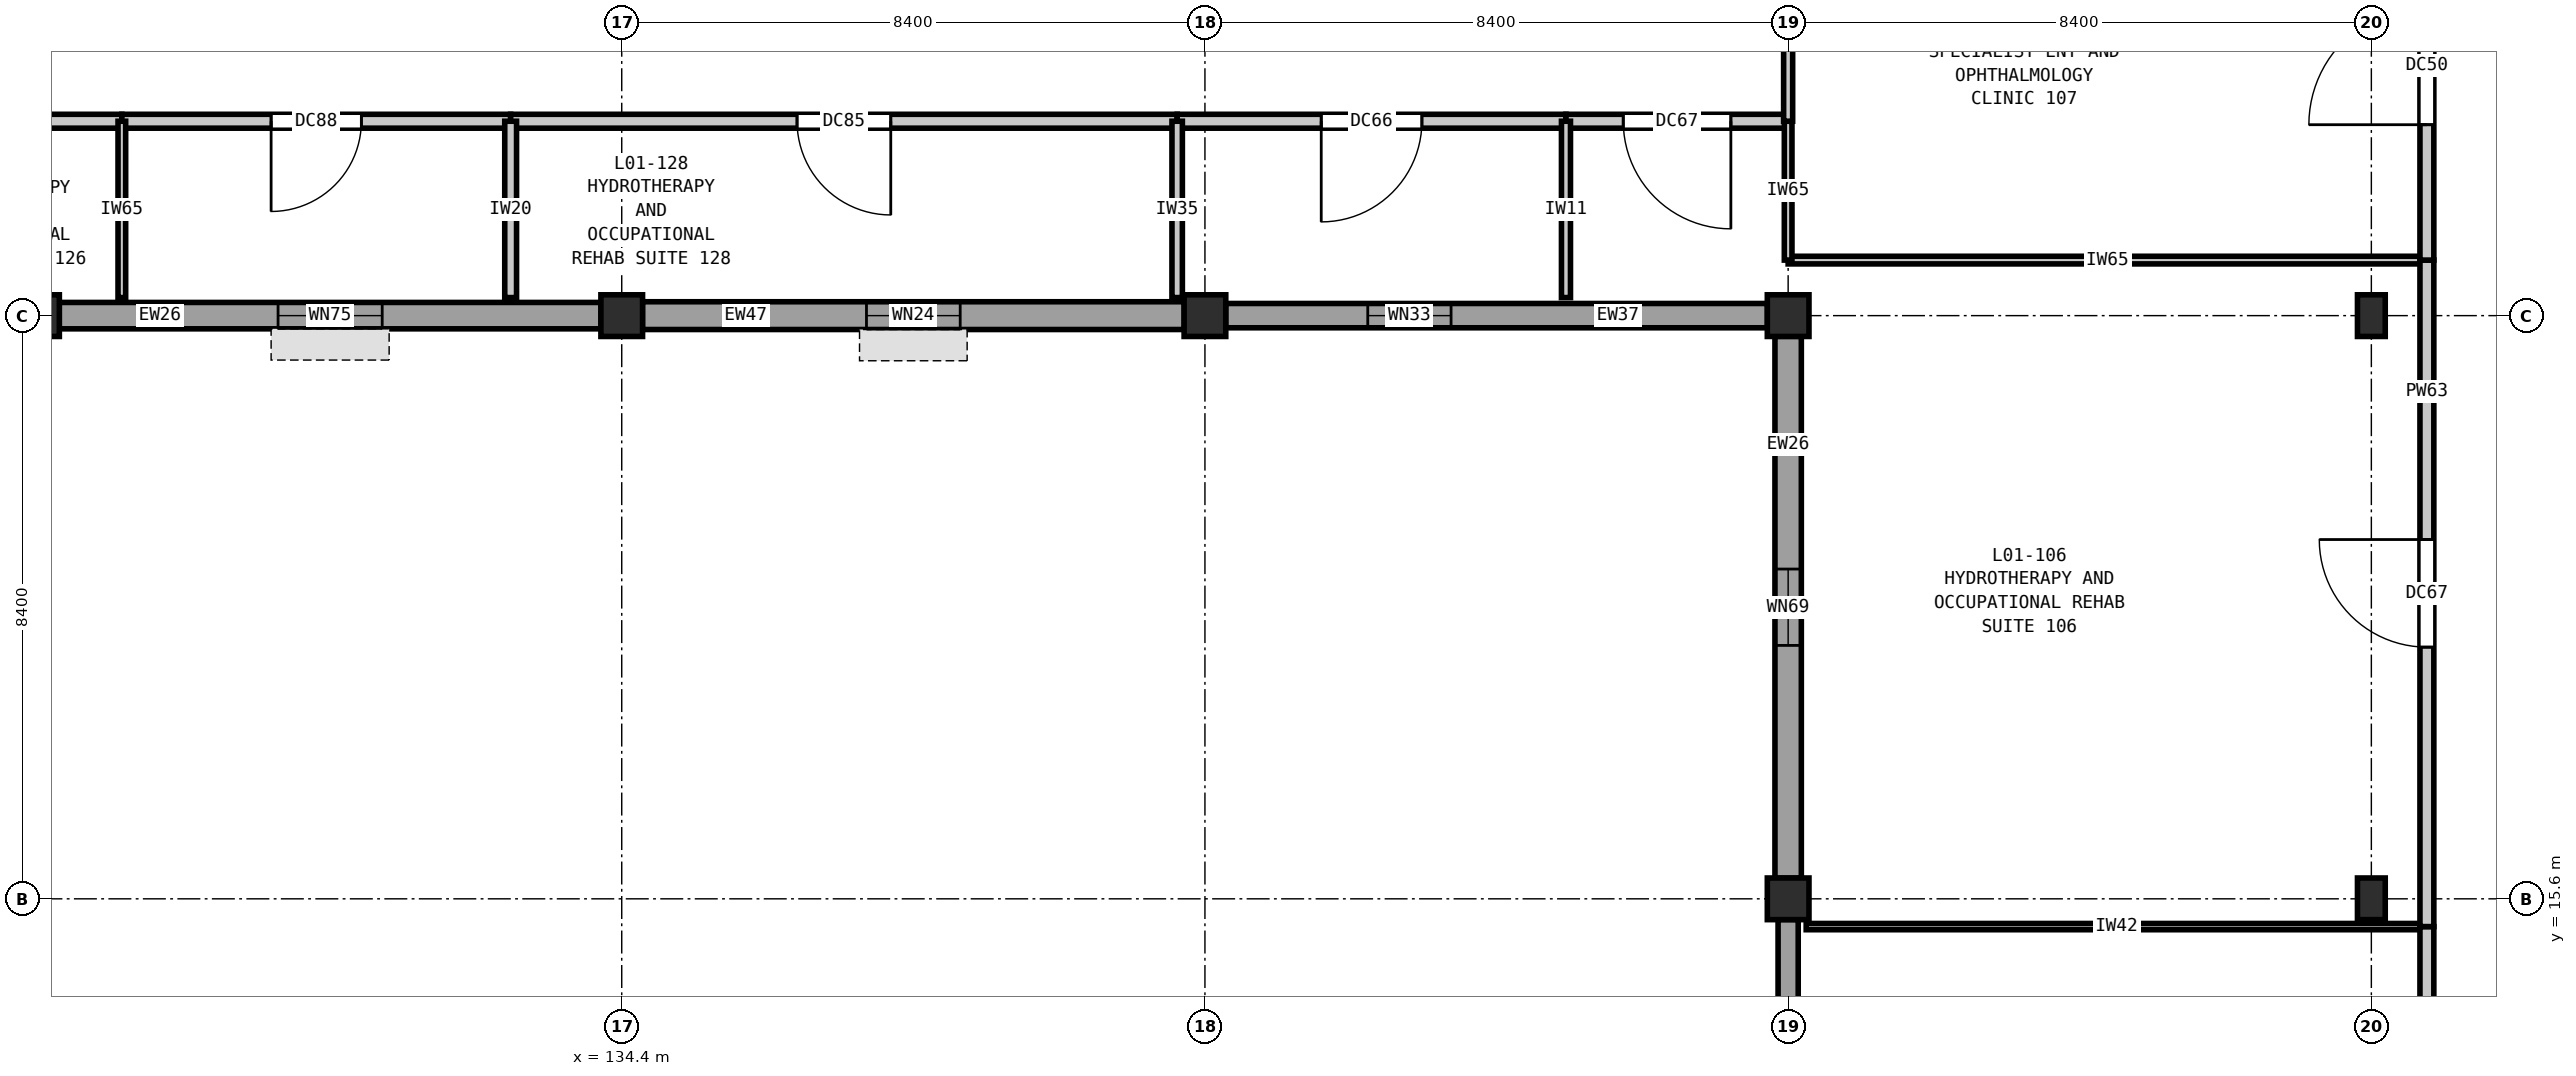
"""IFC4 building model, lengths in metres.
Left out: names, types, materials, properties, quantities, classifications, styles, units other than length and angle.
Written with IfcOpenShell. Run it as: python <this file> out.ifc"""

import sys

from ifc_helpers import new_model, si_unit, direction, frame, frame_2d, origin, origin_2d, place, context, subcontext, project, spatial, rectangle, extrude, element, fill, save


model = new_model("IFC4")
c1 = context("Model", 3, precision=1e-05, world=origin(), true_north=direction((0.0, 1.0)))
c2 = subcontext(c1, "Body", "Model", "MODEL_VIEW")
j1 = project(units=[si_unit("LENGTHUNIT", "METRE"), si_unit("PLANEANGLEUNIT", "RADIAN")], contexts=[c1])
p1 = place(None, origin())
s1 = spatial("IfcSite", under=j1, at=p1, CompositionType="ELEMENT")
p2 = place(p1, origin())
s2 = spatial("IfcBuilding", under=s1, at=p2, CompositionType="ELEMENT")
p3 = place(p2, frame((0.0, 0.0, 5.4)))
s3 = spatial("IfcBuildingStorey", under=s2, at=p3, CompositionType="ELEMENT", Elevation=5.4)
for number, where, z_axis, x_axis in (
    (1, (126.0, 24.0, 0.0), (0.0, 0.0, 1.0), (1.0, 0.0, 0.0)),
    (2, (134.4, 24.0, 0.0), (0.0, 0.0, 1.0), (1.0, 0.0, 0.0)),
    (3, (142.8, 24.0, 0.0), (0.0, 0.0, 1.0), (1.0, 0.0, 0.0)),
    (4, (151.2, 15.6, 0.0), (0.0, 0.0, 1.0), (1.0, 0.0, 0.0)),
    (5, (151.2, 24.0, 0.0), (0.0, 0.0, 1.0), (1.0, 0.0, 0.0)),
):
    element("IfcColumn", number, at=place(p3, frame(where, z_axis=z_axis, x_axis=x_axis)), inside=s3, PredefinedType="COLUMN", context=c2, shape_type="SweptSolid", body=[
        extrude(rectangle(XDim=0.6, YDim=0.6, at=origin_2d()), origin(), (0.0, 0.0, 1.0), 5.4),
    ])
for number, where, z_axis, x_axis in (
    (6, (159.6, 15.6, 0.0), (0.0, 0.0, 1.0), (1.0, 0.0, 0.0)),
    (7, (159.6, 24.0, 0.0), (0.0, 0.0, 1.0), (1.0, 0.0, 0.0)),
):
    element("IfcColumn", number, at=place(p3, frame(where, z_axis=z_axis, x_axis=x_axis)), inside=s3, PredefinedType="COLUMN", context=c2, shape_type="SweptSolid", body=[
        extrude(rectangle(XDim=0.4, YDim=0.6, at=origin_2d()), origin(), (0.0, 0.0, 1.0), 5.4),
    ])
p4 = place(p3, frame((151.2, 7.498, 0.0), z_axis=(0.0, 0.0, 1.0), x_axis=(0.0, 1.0, 0.0)))
e8 = element("IfcWall", 8, at=p4, inside=s3, PredefinedType="SOLIDWALL", context=c2, shape_type="SweptSolid", body=[
    extrude(rectangle(XDim=7.804, YDim=0.29, at=frame_2d((3.902, 0.0))), origin(), (0.0, 0.0, 1.0), 4.68),
])
p5 = place(p4, frame((3.402, 0.0, 0.9)))
e9 = element("IfcOpeningElement", 9, at=p5, cuts=e8, PredefinedType="OPENING", context=c2, shape_type="SweptSolid", body=[
    extrude(rectangle(XDim=1.0, YDim=1.55, at=frame_2d((0.5, 0.775))), frame((0.0, 0.155, 0.0), z_axis=(0.0, -1.0, 0.0), x_axis=(1.0, 0.0, 0.0)), (0.0, 0.0, 1.0), 0.31),
])
p6 = place(p3, frame((151.2, 15.898, 0.0), z_axis=(0.0, 0.0, 1.0), x_axis=(0.0, 1.0, 0.0)))
e10 = element("IfcWall", 10, at=p6, inside=s3, PredefinedType="SOLIDWALL", context=c2, shape_type="SweptSolid", body=[
    extrude(rectangle(XDim=7.804, YDim=0.38, at=frame_2d((3.902, 0.0))), origin(), (0.0, 0.0, 1.0), 4.68),
])
p7 = place(p6, frame((3.352, 0.0, 0.9)))
e11 = element("IfcOpeningElement", 11, at=p7, cuts=e10, PredefinedType="OPENING", context=c2, shape_type="SweptSolid", body=[
    extrude(rectangle(XDim=1.1, YDim=1.55, at=frame_2d((0.55, 0.775))), frame((0.0, 0.2, 0.0), z_axis=(0.0, -1.0, 0.0), x_axis=(1.0, 0.0, 0.0)), (0.0, 0.0, 1.0), 0.4),
])
p8 = place(p3, frame((150.902, 24.0, 0.0), z_axis=(0.0, 0.0, 1.0), x_axis=(-1.0, 0.0, 0.0)))
e12 = element("IfcWall", 12, at=p8, inside=s3, PredefinedType="SOLIDWALL", context=c2, shape_type="SweptSolid", body=[
    extrude(rectangle(XDim=7.804, YDim=0.35, at=frame_2d((3.902, 0.0))), origin(), (0.0, 0.0, 1.0), 4.68),
])
p9 = place(p8, frame((4.557, 0.0, 0.9)))
e13 = element("IfcOpeningElement", 13, at=p9, cuts=e12, PredefinedType="OPENING", context=c2, shape_type="SweptSolid", body=[
    extrude(rectangle(XDim=1.2, YDim=1.55, at=frame_2d((0.6, 0.775))), frame((0.0, 0.185, 0.0), z_axis=(0.0, -1.0, 0.0), x_axis=(1.0, 0.0, 0.0)), (0.0, 0.0, 1.0), 0.37),
])
p10 = place(p3, frame((142.502, 24.0, 0.0), z_axis=(0.0, 0.0, 1.0), x_axis=(-1.0, 0.0, 0.0)))
e14 = element("IfcWall", 14, at=p10, inside=s3, PredefinedType="SOLIDWALL", context=c2, shape_type="SweptSolid", body=[
    extrude(rectangle(XDim=7.804, YDim=0.4, at=frame_2d((3.902, 0.0))), origin(), (0.0, 0.0, 1.0), 4.68),
])
p11 = place(p10, frame((3.227, 0.0, 0.9)))
e15 = element("IfcOpeningElement", 15, at=p11, cuts=e14, PredefinedType="OPENING", context=c2, shape_type="SweptSolid", body=[
    extrude(rectangle(XDim=1.35, YDim=1.55, at=frame_2d((0.675, 0.775))), frame((0.0, 0.21, 0.0), z_axis=(0.0, -1.0, 0.0), x_axis=(1.0, 0.0, 0.0)), (0.0, 0.0, 1.0), 0.42),
])
p12 = place(p3, frame((134.102, 24.0, 0.0), z_axis=(0.0, 0.0, 1.0), x_axis=(-1.0, 0.0, 0.0)))
e16 = element("IfcWall", 16, at=p12, inside=s3, PredefinedType="SOLIDWALL", context=c2, shape_type="SweptSolid", body=[
    extrude(rectangle(XDim=7.804, YDim=0.38, at=frame_2d((3.902, 0.0))), origin(), (0.0, 0.0, 1.0), 4.68),
])
p13 = place(p12, frame((3.152, 0.0, 0.9)))
e17 = element("IfcOpeningElement", 17, at=p13, cuts=e16, PredefinedType="OPENING", context=c2, shape_type="SweptSolid", body=[
    extrude(rectangle(XDim=1.5, YDim=1.55, at=frame_2d((0.75, 0.775))), frame((0.0, 0.2, 0.0), z_axis=(0.0, -1.0, 0.0), x_axis=(1.0, 0.0, 0.0)), (0.0, 0.0, 1.0), 0.4),
])
p14 = place(p3, frame((151.46, 15.2, 0.0), z_axis=(0.0, 0.0, 1.0), x_axis=(1.0, 0.0, 0.0)))
e18 = element("IfcWall", 18, at=p14, inside=s3, PredefinedType="PARTITIONING", context=c2, shape_type="SweptSolid", body=[
    extrude(rectangle(XDim=8.94, YDim=0.09, at=frame_2d((4.47, 0.0))), origin(), (0.0, 0.0, 1.0), 5.05),
])
p15 = place(p3, frame((151.2, 24.8, 0.0), z_axis=(0.0, 0.0, 1.0), x_axis=(1.0, 0.0, 0.0)))
e19 = element("IfcWall", 19, at=p15, inside=s3, PredefinedType="PARTITIONING", context=c2, shape_type="SweptSolid", body=[
    extrude(rectangle(XDim=9.2, YDim=0.11, at=frame_2d((4.6, 0.0))), origin(), (0.0, 0.0, 1.0), 5.05),
])
p16 = place(p3, frame((117.6, 26.8, 0.0), z_axis=(0.0, 0.0, 1.0), x_axis=(1.0, 0.0, 0.0)))
e20 = element("IfcWall", 20, at=p16, inside=s3, PredefinedType="PARTITIONING", context=c2, shape_type="SweptSolid", body=[
    extrude(rectangle(XDim=9.6, YDim=0.2, at=frame_2d((4.8, 0.0))), origin(), (0.0, 0.0, 1.0), 5.05),
])
p17 = place(p16, frame((4.175, 0.0, 0.0)))
e21 = element("IfcOpeningElement", 21, at=p17, cuts=e20, PredefinedType="OPENING", context=c2, shape_type="SweptSolid", body=[
    extrude(rectangle(XDim=1.25, YDim=2.15, at=frame_2d((0.625, 1.075))), frame((0.0, 0.11, 0.0), z_axis=(0.0, -1.0, 0.0), x_axis=(1.0, 0.0, 0.0)), (0.0, 0.0, 1.0), 0.22),
])
p18 = place(p3, frame((127.2, 26.8, 0.0), z_axis=(0.0, 0.0, 1.0), x_axis=(1.0, 0.0, 0.0)))
e22 = element("IfcWall", 22, at=p18, inside=s3, PredefinedType="PARTITIONING", context=c2, shape_type="SweptSolid", body=[
    extrude(rectangle(XDim=5.6, YDim=0.2, at=frame_2d((2.8, 0.0))), origin(), (0.0, 0.0, 1.0), 5.05),
])
p19 = place(p18, frame((2.15, 0.0, 0.0)))
e23 = element("IfcOpeningElement", 23, at=p19, cuts=e22, PredefinedType="OPENING", context=c2, shape_type="SweptSolid", body=[
    extrude(rectangle(XDim=1.3, YDim=2.2, at=frame_2d((0.65, 1.1))), frame((0.0, 0.11, 0.0), z_axis=(0.0, -1.0, 0.0), x_axis=(1.0, 0.0, 0.0)), (0.0, 0.0, 1.0), 0.22),
])
p20 = place(p3, frame((132.8, 26.8, 0.0), z_axis=(0.0, 0.0, 1.0), x_axis=(1.0, 0.0, 0.0)))
e24 = element("IfcWall", 24, at=p20, inside=s3, PredefinedType="PARTITIONING", context=c2, shape_type="SweptSolid", body=[
    extrude(rectangle(XDim=9.6, YDim=0.2, at=frame_2d((4.8, 0.0))), origin(), (0.0, 0.0, 1.0), 5.05),
])
p21 = place(p20, frame((4.125, 0.0, 0.0)))
e25 = element("IfcOpeningElement", 25, at=p21, cuts=e24, PredefinedType="OPENING", context=c2, shape_type="SweptSolid", body=[
    extrude(rectangle(XDim=1.35, YDim=2.2, at=frame_2d((0.675, 1.1))), frame((0.0, 0.11, 0.0), z_axis=(0.0, -1.0, 0.0), x_axis=(1.0, 0.0, 0.0)), (0.0, 0.0, 1.0), 0.22),
])
p22 = place(p3, frame((142.4, 26.8, 0.0), z_axis=(0.0, 0.0, 1.0), x_axis=(1.0, 0.0, 0.0)))
e26 = element("IfcWall", 26, at=p22, inside=s3, PredefinedType="PARTITIONING", context=c2, shape_type="SweptSolid", body=[
    extrude(rectangle(XDim=5.6, YDim=0.2, at=frame_2d((2.8, 0.0))), origin(), (0.0, 0.0, 1.0), 5.05),
])
p23 = place(p22, frame((2.075, 0.0, 0.0)))
e27 = element("IfcOpeningElement", 27, at=p23, cuts=e26, PredefinedType="OPENING", context=c2, shape_type="SweptSolid", body=[
    extrude(rectangle(XDim=1.45, YDim=2.25, at=frame_2d((0.725, 1.125))), frame((0.0, 0.11, 0.0), z_axis=(0.0, -1.0, 0.0), x_axis=(1.0, 0.0, 0.0)), (0.0, 0.0, 1.0), 0.22),
])
p24 = place(p3, frame((148.0, 26.8, 0.0), z_axis=(0.0, 0.0, 1.0), x_axis=(1.0, 0.0, 0.0)))
e28 = element("IfcWall", 28, at=p24, inside=s3, PredefinedType="PARTITIONING", context=c2, shape_type="SweptSolid", body=[
    extrude(rectangle(XDim=3.2, YDim=0.2, at=frame_2d((1.6, 0.0))), origin(), (0.0, 0.0, 1.0), 5.05),
])
p25 = place(p24, frame((0.825, 0.0, 0.0)))
e29 = element("IfcOpeningElement", 29, at=p25, cuts=e28, PredefinedType="OPENING", context=c2, shape_type="SweptSolid", body=[
    extrude(rectangle(XDim=1.55, YDim=2.25, at=frame_2d((0.775, 1.125))), frame((0.0, 0.11, 0.0), z_axis=(0.0, -1.0, 0.0), x_axis=(1.0, 0.0, 0.0)), (0.0, 0.0, 1.0), 0.22),
])
p26 = place(p3, frame((127.2, 24.26, 0.0), z_axis=(0.0, 0.0, 1.0), x_axis=(0.0, 1.0, 0.0)))
e30 = element("IfcWall", 30, at=p26, inside=s3, PredefinedType="PARTITIONING", context=c2, shape_type="SweptSolid", body=[
    extrude(rectangle(XDim=2.54, YDim=0.11, at=frame_2d((1.27, 0.0))), origin(), (0.0, 0.0, 1.0), 5.05),
])
p27 = place(p3, frame((132.8, 24.26, 0.0), z_axis=(0.0, 0.0, 1.0), x_axis=(0.0, 1.0, 0.0)))
e31 = element("IfcWall", 31, at=p27, inside=s3, PredefinedType="PARTITIONING", context=c2, shape_type="SweptSolid", body=[
    extrude(rectangle(XDim=2.54, YDim=0.17, at=frame_2d((1.27, 0.0))), origin(), (0.0, 0.0, 1.0), 5.05),
])
p28 = place(p3, frame((142.4, 24.26, 0.0), z_axis=(0.0, 0.0, 1.0), x_axis=(0.0, 1.0, 0.0)))
e32 = element("IfcWall", 32, at=p28, inside=s3, PredefinedType="PARTITIONING", context=c2, shape_type="SweptSolid", body=[
    extrude(rectangle(XDim=2.54, YDim=0.15, at=frame_2d((1.27, 0.0))), origin(), (0.0, 0.0, 1.0), 5.05),
])
p29 = place(p3, frame((148.0, 24.26, 0.0), z_axis=(0.0, 0.0, 1.0), x_axis=(0.0, 1.0, 0.0)))
e33 = element("IfcWall", 33, at=p29, inside=s3, PredefinedType="PARTITIONING", context=c2, shape_type="SweptSolid", body=[
    extrude(rectangle(XDim=2.54, YDim=0.13, at=frame_2d((1.27, 0.0))), origin(), (0.0, 0.0, 1.0), 5.05),
])
p30 = place(p3, frame((151.2, 24.8, 0.0), z_axis=(0.0, 0.0, 1.0), x_axis=(0.0, 1.0, 0.0)))
e34 = element("IfcWall", 34, at=p30, inside=s3, PredefinedType="PARTITIONING", context=c2, shape_type="SweptSolid", body=[
    extrude(rectangle(XDim=2.0, YDim=0.11, at=frame_2d((1.0, 0.0))), origin(), (0.0, 0.0, 1.0), 4.735),
])
p31 = place(p3, frame((151.2, 26.8, 0.0), z_axis=(0.0, 0.0, 1.0), x_axis=(0.0, 1.0, 0.0)))
e35 = element("IfcWall", 35, at=p31, inside=s3, PredefinedType="PARTITIONING", context=c2, shape_type="SweptSolid", body=[
    extrude(rectangle(XDim=2.8, YDim=0.13, at=frame_2d((1.4, 0.0))), origin(), (0.0, 0.0, 1.0), 4.735),
])
p32 = place(p3, frame((160.4, 9.6, 0.0), z_axis=(0.0, 0.0, 1.0), x_axis=(0.0, 1.0, 0.0)))
e36 = element("IfcWall", 36, at=p32, inside=s3, PredefinedType="PARTITIONING", context=c2, shape_type="SweptSolid", body=[
    extrude(rectangle(XDim=5.6, YDim=0.2, at=frame_2d((2.8, 0.0))), origin(), (0.0, 0.0, 1.0), 5.05),
])
p33 = place(p32, frame((2.075, 0.0, 0.0)))
e37 = element("IfcOpeningElement", 37, at=p33, cuts=e36, PredefinedType="OPENING", context=c2, shape_type="SweptSolid", body=[
    extrude(rectangle(XDim=1.45, YDim=2.25, at=frame_2d((0.725, 1.125))), frame((0.0, 0.11, 0.0), z_axis=(0.0, -1.0, 0.0), x_axis=(1.0, 0.0, 0.0)), (0.0, 0.0, 1.0), 0.22),
])
p34 = place(p3, frame((160.4, 15.2, 0.0), z_axis=(0.0, 0.0, 1.0), x_axis=(0.0, 1.0, 0.0)))
e38 = element("IfcWall", 38, at=p34, inside=s3, PredefinedType="PARTITIONING", context=c2, shape_type="SweptSolid", body=[
    extrude(rectangle(XDim=9.6, YDim=0.2, at=frame_2d((4.8, 0.0))), origin(), (0.0, 0.0, 1.0), 5.05),
])
p35 = place(p34, frame((4.025, 0.0, 0.0)))
e39 = element("IfcOpeningElement", 39, at=p35, cuts=e38, PredefinedType="OPENING", context=c2, shape_type="SweptSolid", body=[
    extrude(rectangle(XDim=1.55, YDim=2.25, at=frame_2d((0.775, 1.125))), frame((0.0, 0.11, 0.0), z_axis=(0.0, -1.0, 0.0), x_axis=(1.0, 0.0, 0.0)), (0.0, 0.0, 1.0), 0.22),
])
p36 = place(p3, frame((160.4, 24.8, 0.0), z_axis=(0.0, 0.0, 1.0), x_axis=(0.0, 1.0, 0.0)))
e40 = element("IfcWall", 40, at=p36, inside=s3, PredefinedType="PARTITIONING", context=c2, shape_type="SweptSolid", body=[
    extrude(rectangle(XDim=5.6, YDim=0.2, at=frame_2d((2.8, 0.0))), origin(), (0.0, 0.0, 1.0), 5.05),
])
p37 = place(p36, frame((1.95, 0.0, 0.0)))
e41 = element("IfcOpeningElement", 41, at=p37, cuts=e40, PredefinedType="OPENING", context=c2, shape_type="SweptSolid", body=[
    extrude(rectangle(XDim=1.7, YDim=2.3, at=frame_2d((0.85, 1.15))), frame((0.0, 0.11, 0.0), z_axis=(0.0, -1.0, 0.0), x_axis=(1.0, 0.0, 0.0)), (0.0, 0.0, 1.0), 0.22),
])
p38 = place(p7, origin())
e42 = element("IfcWindow", 42, at=p38, inside=s3, PartitioningType="SINGLE_PANEL", PredefinedType="WINDOW", context=c2, shape_type="SweptSolid", body=[
    extrude(rectangle(XDim=1.1, YDim=1.55, at=frame_2d((0.55, 0.775))), frame((0.0, 0.03, 0.0), z_axis=(0.0, -1.0, 0.0), x_axis=(1.0, 0.0, 0.0)), (0.0, 0.0, 1.0), 0.06),
])
fill(e11, e42)
p39 = place(p9, origin())
e43 = element("IfcWindow", 43, at=p39, inside=s3, PartitioningType="SINGLE_PANEL", PredefinedType="WINDOW", context=c2, shape_type="SweptSolid", body=[
    extrude(rectangle(XDim=1.2, YDim=1.55, at=frame_2d((0.6, 0.775))), frame((0.0, 0.03, 0.0), z_axis=(0.0, -1.0, 0.0), x_axis=(1.0, 0.0, 0.0)), (0.0, 0.0, 1.0), 0.06),
])
fill(e13, e43)
p40 = place(p11, origin())
e44 = element("IfcWindow", 44, at=p40, inside=s3, PartitioningType="SINGLE_PANEL", PredefinedType="WINDOW", context=c2, shape_type="SweptSolid", body=[
    extrude(rectangle(XDim=1.35, YDim=1.55, at=frame_2d((0.675, 0.775))), frame((0.0, 0.03, 0.0), z_axis=(0.0, -1.0, 0.0), x_axis=(1.0, 0.0, 0.0)), (0.0, 0.0, 1.0), 0.06),
])
fill(e15, e44)
p41 = place(p13, origin())
e45 = element("IfcWindow", 45, at=p41, inside=s3, PartitioningType="SINGLE_PANEL", PredefinedType="WINDOW", context=c2, shape_type="SweptSolid", body=[
    extrude(rectangle(XDim=1.5, YDim=1.55, at=frame_2d((0.75, 0.775))), frame((0.0, 0.03, 0.0), z_axis=(0.0, -1.0, 0.0), x_axis=(1.0, 0.0, 0.0)), (0.0, 0.0, 1.0), 0.06),
])
fill(e17, e45)
p42 = place(p19, frame((1.3, 0.0, 0.0), z_axis=(0.0, 0.0, 1.0), x_axis=(-1.0, 0.0, 0.0)))
e46 = element("IfcDoor", 46, at=p42, inside=s3, OperationType="SINGLE_SWING_RIGHT", PredefinedType="DOOR", context=c2, shape_type="SweptSolid", body=[
    extrude(rectangle(XDim=1.3, YDim=2.2, at=frame_2d((0.65, 1.1))), frame((0.0, 0.025, 0.0), z_axis=(0.0, -1.0, 0.0), x_axis=(1.0, 0.0, 0.0)), (0.0, 0.0, 1.0), 0.05),
])
fill(e23, e46)
p43 = place(p21, frame((1.35, 0.0, 0.0), z_axis=(0.0, 0.0, 1.0), x_axis=(-1.0, 0.0, 0.0)))
e47 = element("IfcDoor", 47, at=p43, inside=s3, OperationType="SINGLE_SWING_LEFT", PredefinedType="DOOR", context=c2, shape_type="SweptSolid", body=[
    extrude(rectangle(XDim=1.35, YDim=2.2, at=frame_2d((0.675, 1.1))), frame((0.0, 0.025, 0.0), z_axis=(0.0, -1.0, 0.0), x_axis=(1.0, 0.0, 0.0)), (0.0, 0.0, 1.0), 0.05),
])
fill(e25, e47)
p44 = place(p23, frame((1.45, 0.0, 0.0), z_axis=(0.0, 0.0, 1.0), x_axis=(-1.0, 0.0, 0.0)))
e48 = element("IfcDoor", 48, at=p44, inside=s3, OperationType="SINGLE_SWING_RIGHT", PredefinedType="DOOR", context=c2, shape_type="SweptSolid", body=[
    extrude(rectangle(XDim=1.45, YDim=2.25, at=frame_2d((0.725, 1.125))), frame((0.0, 0.025, 0.0), z_axis=(0.0, -1.0, 0.0), x_axis=(1.0, 0.0, 0.0)), (0.0, 0.0, 1.0), 0.05),
])
fill(e27, e48)
p45 = place(p25, frame((1.55, 0.0, 0.0), z_axis=(0.0, 0.0, 1.0), x_axis=(-1.0, 0.0, 0.0)))
e49 = element("IfcDoor", 49, at=p45, inside=s3, OperationType="SINGLE_SWING_LEFT", PredefinedType="DOOR", context=c2, shape_type="SweptSolid", body=[
    extrude(rectangle(XDim=1.55, YDim=2.25, at=frame_2d((0.775, 1.125))), frame((0.0, 0.025, 0.0), z_axis=(0.0, -1.0, 0.0), x_axis=(1.0, 0.0, 0.0)), (0.0, 0.0, 1.0), 0.05),
])
fill(e29, e49)
p46 = place(p35, origin())
e50 = element("IfcDoor", 50, at=p46, inside=s3, OperationType="SINGLE_SWING_RIGHT", PredefinedType="DOOR", context=c2, shape_type="SweptSolid", body=[
    extrude(rectangle(XDim=1.55, YDim=2.25, at=frame_2d((0.775, 1.125))), frame((0.0, 0.025, 0.0), z_axis=(0.0, -1.0, 0.0), x_axis=(1.0, 0.0, 0.0)), (0.0, 0.0, 1.0), 0.05),
])
fill(e39, e50)
p47 = place(p37, origin())
e51 = element("IfcDoor", 51, at=p47, inside=s3, OperationType="SINGLE_SWING_LEFT", PredefinedType="DOOR", context=c2, shape_type="SweptSolid", body=[
    extrude(rectangle(XDim=1.7, YDim=2.3, at=frame_2d((0.85, 1.15))), frame((0.0, 0.025, 0.0), z_axis=(0.0, -1.0, 0.0), x_axis=(1.0, 0.0, 0.0)), (0.0, 0.0, 1.0), 0.05),
])
fill(e41, e51)
save(model, sys.argv[1])
